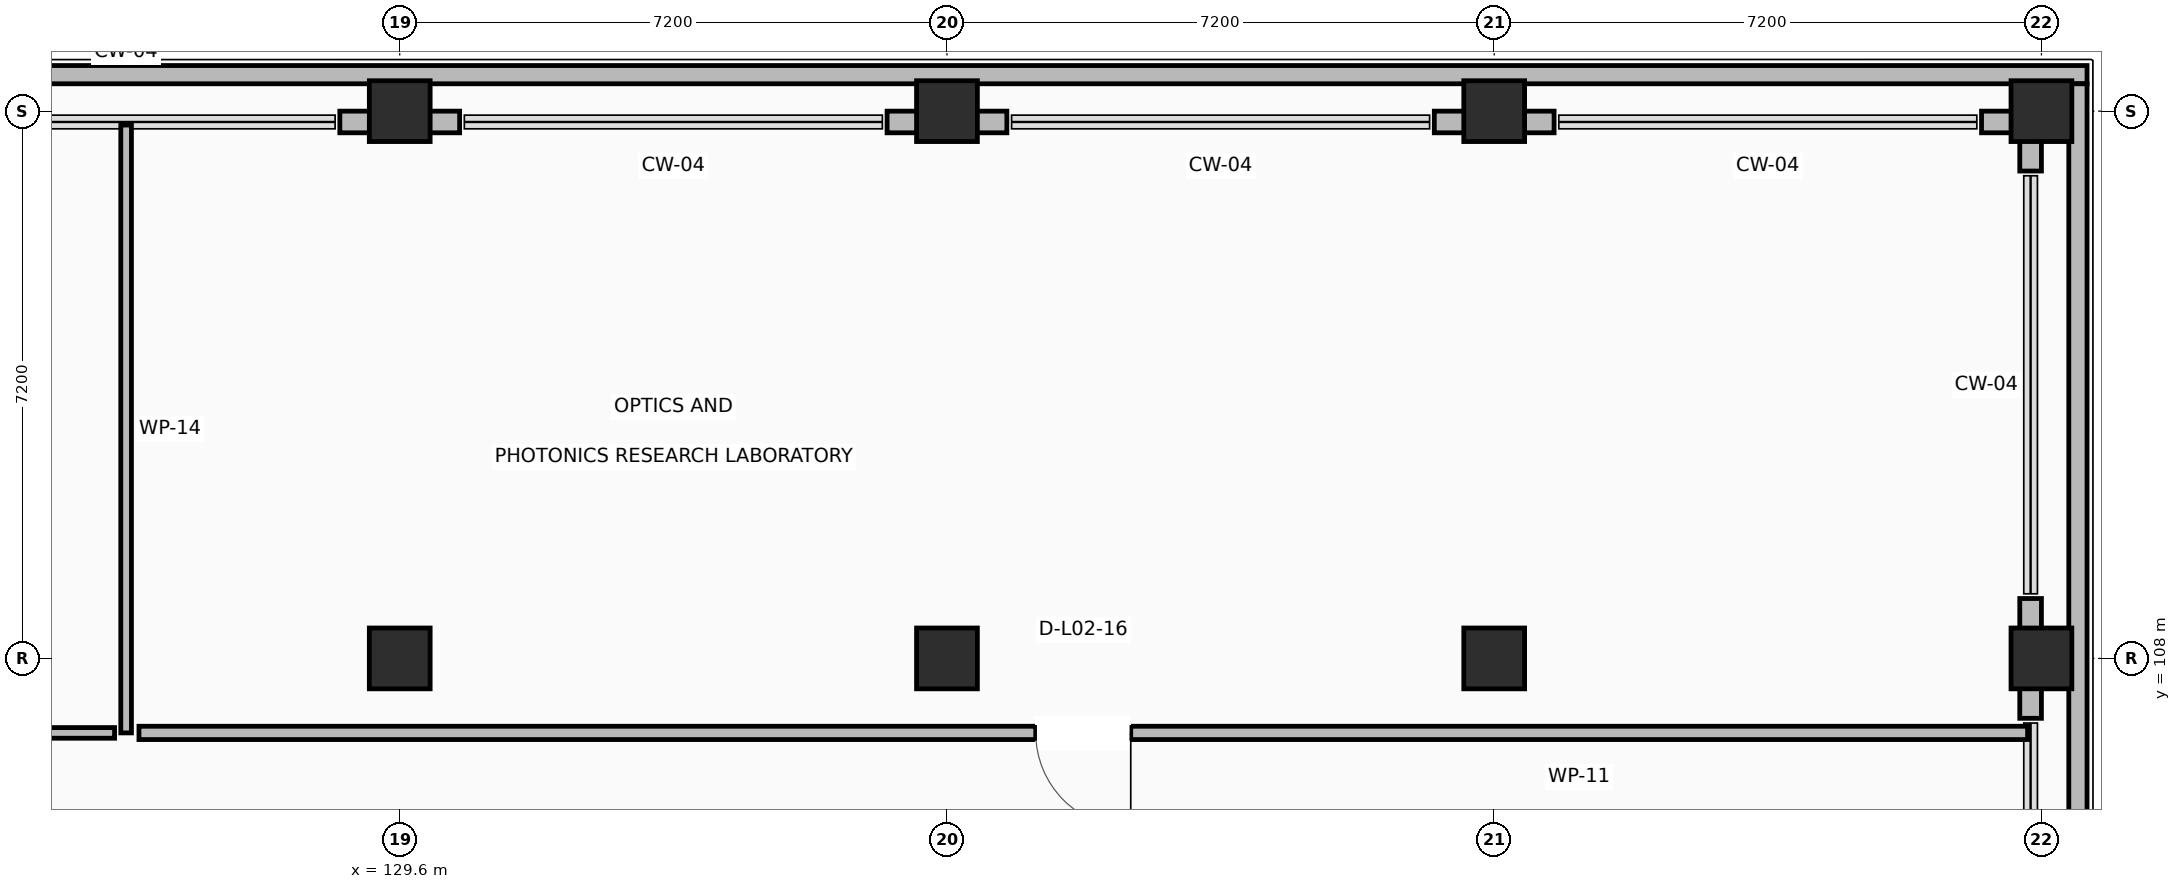
"""IFC4 building model, lengths in metres.
Left out: names, types, materials, properties, quantities, classifications, styles, units other than length and angle.
Written with IfcOpenShell. Run it as: python <this file> out.ifc"""

import sys

from ifc_helpers import new_model, si_unit, direction, frame, frame_2d, origin, origin_2d, place, context, subcontext, project, spatial, rectangle, extrude, element, fill, save


model = new_model("IFC4")
c1 = context("Model", 3, precision=1e-05, world=origin(), true_north=direction((0.0, 1.0)))
c2 = subcontext(c1, "Body", "Model", "MODEL_VIEW")
j1 = project(units=[si_unit("LENGTHUNIT", "METRE"), si_unit("PLANEANGLEUNIT", "RADIAN")], contexts=[c1])
p1 = place(None, origin())
s1 = spatial("IfcSite", under=j1, at=p1, CompositionType="ELEMENT")
p2 = place(p1, origin())
s2 = spatial("IfcBuilding", under=s1, at=p2, CompositionType="ELEMENT")
p3 = place(p2, frame((0.0, 0.0, 9.0)))
s3 = spatial("IfcBuildingStorey", under=s2, at=p3, CompositionType="ELEMENT", Elevation=9.0)
for number, where, z_axis, x_axis in (
    (1, (129.6, 108.0, 0.0), (0.0, 0.0, 1.0), (1.0, 0.0, 0.0)),
    (2, (129.6, 115.2, 0.0), (0.0, 0.0, 1.0), (1.0, 0.0, 0.0)),
    (3, (136.8, 108.0, 0.0), (0.0, 0.0, 1.0), (1.0, 0.0, 0.0)),
    (4, (136.8, 115.2, 0.0), (0.0, 0.0, 1.0), (1.0, 0.0, 0.0)),
    (5, (144.0, 108.0, 0.0), (0.0, 0.0, 1.0), (1.0, 0.0, 0.0)),
    (6, (144.0, 115.2, 0.0), (0.0, 0.0, 1.0), (1.0, 0.0, 0.0)),
    (7, (151.2, 108.0, 0.0), (0.0, 0.0, 1.0), (1.0, 0.0, 0.0)),
    (8, (151.2, 115.2, 0.0), (0.0, 0.0, 1.0), (1.0, 0.0, 0.0)),
):
    element("IfcColumn", number, at=place(p3, frame(where, z_axis=z_axis, x_axis=x_axis)), inside=s3, PredefinedType="COLUMN", context=c2, shape_type="SweptSolid", body=[
        extrude(rectangle(XDim=0.8, YDim=0.8, at=origin_2d()), origin(), (0.0, 0.0, 1.0), 4.22),
    ])
p4 = place(p3, frame((151.058, 107.212, 0.0), z_axis=(0.0, 0.0, 1.0), x_axis=(0.0, 1.0, 0.0)))
e9 = element("IfcWall", 9, at=p4, inside=s3, PredefinedType="STANDARD", context=c2, shape_type="SweptSolid", body=[
    extrude(rectangle(XDim=1.576, YDim=0.285, at=frame_2d((0.788, 0.0))), origin(), (0.0, 0.0, 1.0), 3.26),
])
p5 = place(p3, frame((151.058, 114.412, 0.0), z_axis=(0.0, 0.0, 1.0), x_axis=(0.0, 1.0, 0.0)))
e10 = element("IfcWall", 10, at=p5, inside=s3, PredefinedType="STANDARD", context=c2, shape_type="SweptSolid", body=[
    extrude(rectangle(XDim=0.503, YDim=0.285, at=frame_2d((0.251, 0.0))), origin(), (0.0, 0.0, 1.0), 3.26),
])
p6 = place(p3, frame((151.2, 115.058, 0.0), z_axis=(0.0, 0.0, 1.0), x_axis=(-1.0, 0.0, 0.0)))
e11 = element("IfcWall", 11, at=p6, inside=s3, PredefinedType="STANDARD", context=c2, shape_type="SweptSolid", body=[
    extrude(rectangle(XDim=0.788, YDim=0.285, at=frame_2d((0.394, 0.0))), origin(), (0.0, 0.0, 1.0), 3.26),
])
p7 = place(p3, frame((144.788, 115.058, 0.0), z_axis=(0.0, 0.0, 1.0), x_axis=(-1.0, 0.0, 0.0)))
e12 = element("IfcWall", 12, at=p7, inside=s3, PredefinedType="STANDARD", context=c2, shape_type="SweptSolid", body=[
    extrude(rectangle(XDim=1.576, YDim=0.285, at=frame_2d((0.788, 0.0))), origin(), (0.0, 0.0, 1.0), 3.26),
])
for number, where, z_axis, x_axis in (
    (13, (137.588, 115.058, 0.0), (0.0, 0.0, 1.0), (-1.0, 0.0, 0.0)),
    (14, (130.388, 115.058, 0.0), (0.0, 0.0, 1.0), (-1.0, 0.0, 0.0)),
):
    element("IfcWall", number, at=place(p3, frame(where, z_axis=z_axis, x_axis=x_axis)), inside=s3, PredefinedType="STANDARD", context=c2, shape_type="SweptSolid", body=[
        extrude(rectangle(XDim=1.576, YDim=0.285, at=frame_2d((0.788, 0.0))), origin(), (0.0, 0.0, 1.0), 3.26),
    ])
p8 = place(p3, frame((78.6, 115.68, 0.0), z_axis=(0.0, 0.0, 1.0), x_axis=(1.0, 0.0, 0.0)))
e15 = element("IfcWall", 15, at=p8, inside=s3, PredefinedType="PARAPET", context=c2, shape_type="SweptSolid", body=[
    extrude(rectangle(XDim=73.2, YDim=0.24, at=frame_2d((36.6, 0.0))), origin(), (0.0, 0.0, 1.0), 1.12),
])
p9 = place(p3, frame((151.68, 115.56, 0.0), z_axis=(0.0, 0.0, 1.0), x_axis=(0.0, -1.0, 0.0)))
e16 = element("IfcWall", 16, at=p9, inside=s3, PredefinedType="PARAPET", context=c2, shape_type="SweptSolid", body=[
    extrude(rectangle(XDim=21.36, YDim=0.24, at=frame_2d((10.68, 0.0))), origin(), (0.0, 0.0, 1.0), 1.12),
])
p10 = place(p3, frame((126.0, 115.017, 0.0), z_axis=(0.0, 0.0, 1.0), x_axis=(0.0, -1.0, 0.0)))
e17 = element("IfcWall", 17, at=p10, inside=s3, PredefinedType="PARTITIONING", context=c2, shape_type="SweptSolid", body=[
    extrude(rectangle(XDim=7.997, YDim=0.14, at=frame_2d((3.999, 0.0))), origin(), (0.0, 0.0, 1.0), 3.26),
])
p11 = place(p3, frame((125.848, 107.02, 0.0), z_axis=(0.0, 0.0, 1.0), x_axis=(-1.0, 0.0, 0.0)))
e18 = element("IfcWall", 18, at=p11, inside=s3, PredefinedType="PARTITIONING", context=c2, shape_type="SweptSolid", body=[
    extrude(rectangle(XDim=24.852, YDim=0.14, at=frame_2d((12.426, 0.0))), origin(), (0.0, 0.0, 1.0), 3.26),
])
p12 = place(p11, frame((11.936, 0.0, 0.0)))
e19 = element("IfcOpeningElement", 19, at=p12, cuts=e18, PredefinedType="OPENING", context=c2, shape_type="SweptSolid", body=[
    extrude(rectangle(XDim=0.98, YDim=2.1, at=frame_2d((0.49, 1.05))), frame((0.0, 0.08, 0.0), z_axis=(0.0, -1.0, 0.0), x_axis=(1.0, 0.0, 0.0)), (0.0, 0.0, 1.0), 0.16),
])
p13 = place(p3, frame((151.018, 107.02, 0.0), z_axis=(0.0, 0.0, 1.0), x_axis=(-1.0, 0.0, 0.0)))
e20 = element("IfcWall", 20, at=p13, inside=s3, PredefinedType="PARTITIONING", context=c2, shape_type="SweptSolid", body=[
    extrude(rectangle(XDim=24.849, YDim=0.175, at=frame_2d((12.425, 0.0))), origin(), (0.0, 0.0, 1.0), 3.26),
])
p14 = place(p13, frame((11.8, 0.0, 0.0)))
e21 = element("IfcOpeningElement", 21, at=p14, cuts=e20, PredefinedType="OPENING", context=c2, shape_type="SweptSolid", body=[
    extrude(rectangle(XDim=1.25, YDim=2.15, at=frame_2d((0.625, 1.075))), frame((0.0, 0.097, 0.0), z_axis=(0.0, -1.0, 0.0), x_axis=(1.0, 0.0, 0.0)), (0.0, 0.0, 1.0), 0.195),
])
p15 = place(p14, origin())
e22 = element("IfcDoor", 22, at=p15, inside=s3, OperationType="SINGLE_SWING_LEFT", PredefinedType="DOOR", context=c2, shape_type="SweptSolid", body=[
    extrude(rectangle(XDim=1.25, YDim=2.15, at=frame_2d((0.625, 1.075))), frame((0.0, 0.025, 0.0), z_axis=(0.0, -1.0, 0.0), x_axis=(1.0, 0.0, 0.0)), (0.0, 0.0, 1.0), 0.05),
])
fill(e21, e22)
save(model, sys.argv[1])
